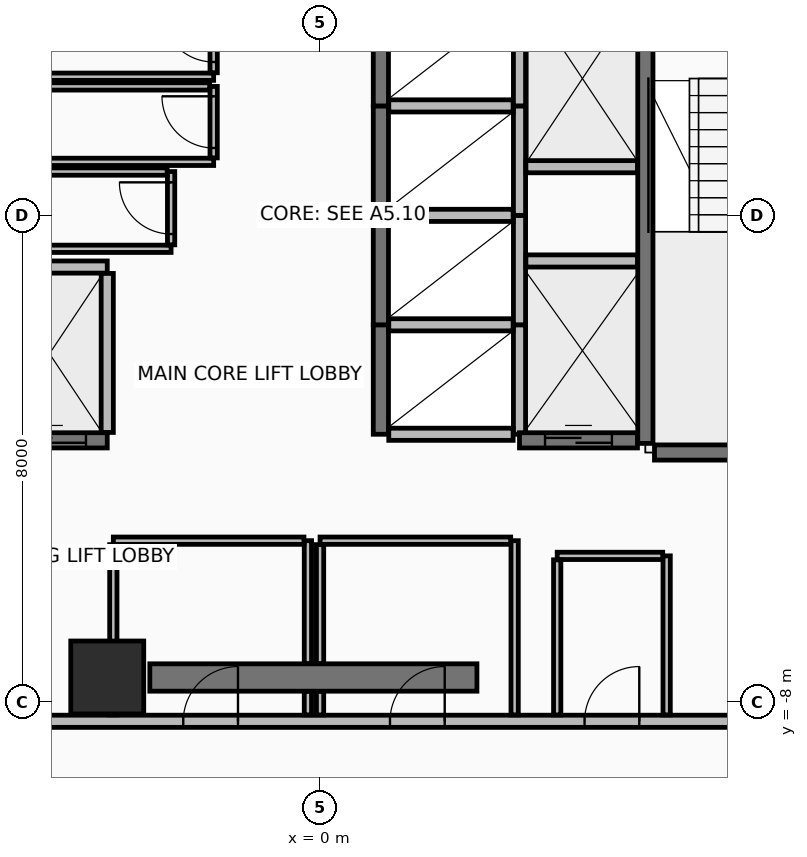
"""IFC4 building model, lengths in metres.
Left out: names, types, materials, properties, quantities, classifications, styles, units other than length and angle.
Written with IfcOpenShell. Run it as: python <this file> out.ifc"""

import sys

from ifc_helpers import new_model, si_unit, direction, frame, frame_2d, origin, origin_2d, place, context, subcontext, project, spatial, rectangle, extrude, element, fill, save


model = new_model("IFC4")
c1 = context("Model", 3, precision=1e-05, world=origin(), true_north=direction((0.0, 1.0)))
c2 = subcontext(c1, "Body", "Model", "MODEL_VIEW")
j1 = project(units=[si_unit("LENGTHUNIT", "METRE"), si_unit("PLANEANGLEUNIT", "RADIAN")], contexts=[c1])
p1 = place(None, origin())
s1 = spatial("IfcSite", under=j1, at=p1, CompositionType="ELEMENT")
p2 = place(p1, origin())
s2 = spatial("IfcBuilding", under=s1, at=p2, CompositionType="ELEMENT")
p3 = place(p2, frame((0.0, 0.0, 174.1)))
s3 = spatial("IfcBuildingStorey", under=s2, at=p3, CompositionType="ELEMENT", Elevation=174.1)
p4 = place(p3, frame((-3.5, -7.6, 0.0), z_axis=(0.0, 0.0, 1.0), x_axis=(1.0, 0.0, 0.0)))
e1 = element("IfcColumn", 1, at=p4, inside=s3, PredefinedType="COLUMN", context=c2, shape_type="SweptSolid", body=[
    extrude(rectangle(XDim=1.2, YDim=1.2, at=origin_2d()), origin(), (0.0, 0.0, 1.0), 3.6),
])
p5 = place(p3, frame((-2.8, -7.6, 0.0), z_axis=(0.0, 0.0, 1.0), x_axis=(1.0, 0.0, 0.0)))
e2 = element("IfcWall", 2, at=p5, inside=s3, PredefinedType="SHEAR", context=c2, shape_type="SweptSolid", body=[
    extrude(rectangle(XDim=5.38, YDim=0.45, at=frame_2d((2.69, 0.0))), origin(), (0.0, 0.0, 1.0), 3.42),
])
p6 = place(p3, frame((-9.62, -8.32, 0.0), z_axis=(0.0, 0.0, 1.0), x_axis=(1.0, 0.0, 0.0)))
e3 = element("IfcWall", 3, at=p6, inside=s3, PredefinedType="PARTITIONING", context=c2, shape_type="SweptSolid", body=[
    extrude(rectangle(XDim=19.24, YDim=0.2, at=frame_2d((9.62, 0.0))), origin(), (0.0, 0.0, 1.0), 2.865),
])
p7 = place(p6, frame((7.37, 0.0, 0.0)))
e4 = element("IfcOpeningElement", 4, at=p7, cuts=e3, PredefinedType="OPENING", context=c2, shape_type="SweptSolid", body=[
    extrude(rectangle(XDim=0.9, YDim=2.1, at=frame_2d((0.45, 1.05))), frame((0.0, 0.11, 0.0), z_axis=(0.0, -1.0, 0.0), x_axis=(1.0, 0.0, 0.0)), (0.0, 0.0, 1.0), 0.22),
])
p8 = place(p6, frame((10.77, 0.0, 0.0)))
e5 = element("IfcOpeningElement", 5, at=p8, cuts=e3, PredefinedType="OPENING", context=c2, shape_type="SweptSolid", body=[
    extrude(rectangle(XDim=0.9, YDim=2.1, at=frame_2d((0.45, 1.05))), frame((0.0, 0.11, 0.0), z_axis=(0.0, -1.0, 0.0), x_axis=(1.0, 0.0, 0.0)), (0.0, 0.0, 1.0), 0.22),
])
p9 = place(p6, frame((13.97, 0.0, 0.0)))
e6 = element("IfcOpeningElement", 6, at=p9, cuts=e3, PredefinedType="OPENING", context=c2, shape_type="SweptSolid", body=[
    extrude(rectangle(XDim=0.9, YDim=2.1, at=frame_2d((0.45, 1.05))), frame((0.0, 0.11, 0.0), z_axis=(0.0, -1.0, 0.0), x_axis=(1.0, 0.0, 0.0)), (0.0, 0.0, 1.0), 0.22),
])
p10 = place(p3, frame((5.35, -3.75, 0.0), z_axis=(0.0, 0.0, 1.0), x_axis=(0.0, 1.0, 0.0)))
e7 = element("IfcWall", 7, at=p10, inside=s3, PredefinedType="SHEAR", context=c2, shape_type="SweptSolid", body=[
    extrude(rectangle(XDim=7.3, YDim=0.25, at=frame_2d((3.65, 0.0))), origin(), (0.0, 0.0, 1.0), 3.42),
])
p11 = place(p3, frame((5.5, -3.9, 0.0), z_axis=(0.0, 0.0, 1.0), x_axis=(1.0, 0.0, 0.0)))
e8 = element("IfcWall", 8, at=p11, inside=s3, PredefinedType="SHEAR", context=c2, shape_type="SweptSolid", body=[
    extrude(rectangle(XDim=3.0, YDim=0.25, at=frame_2d((1.5, 0.0))), origin(), (0.0, 0.0, 1.0), 3.42),
])
p12 = place(p3, frame((1.0, -3.6, 0.0), z_axis=(0.0, 0.0, 1.0), x_axis=(0.0, 1.0, 0.0)))
e9 = element("IfcWall", 9, at=p12, inside=s3, PredefinedType="SHEAR", context=c2, shape_type="SweptSolid", body=[
    extrude(rectangle(XDim=1.8, YDim=0.25, at=frame_2d((0.9, 0.0))), origin(), (0.0, 0.0, 1.0), 3.42),
])
p13 = place(p3, frame((3.28, -3.6, 0.0), z_axis=(0.0, 0.0, 1.0), x_axis=(0.0, 1.0, 0.0)))
e10 = element("IfcWall", 10, at=p13, inside=s3, PredefinedType="PARTITIONING", context=c2, shape_type="SweptSolid", body=[
    extrude(rectangle(XDim=1.8, YDim=0.2, at=frame_2d((0.9, 0.0))), origin(), (0.0, 0.0, 1.0), 3.42),
])
for number, where, z_axis, x_axis in (
    (11, (1.13, -3.6, 0.0), (0.0, 0.0, 1.0), (1.0, 0.0, 0.0)),
    (12, (1.13, -1.8, 0.0), (0.0, 0.0, 1.0), (1.0, 0.0, 0.0)),
):
    element("IfcWall", number, at=place(p3, frame(where, z_axis=z_axis, x_axis=x_axis)), inside=s3, PredefinedType="PARTITIONING", context=c2, shape_type="SweptSolid", body=[
        extrude(rectangle(XDim=2.045, YDim=0.2, at=frame_2d((1.022, 0.0))), origin(), (0.0, 0.0, 1.0), 3.42),
    ])
p14 = place(p3, frame((1.0, -1.8, 0.0), z_axis=(0.0, 0.0, 1.0), x_axis=(0.0, 1.0, 0.0)))
e13 = element("IfcWall", 13, at=p14, inside=s3, PredefinedType="SHEAR", context=c2, shape_type="SweptSolid", body=[
    extrude(rectangle(XDim=1.8, YDim=0.25, at=frame_2d((0.9, 0.0))), origin(), (0.0, 0.0, 1.0), 3.42),
])
p15 = place(p3, frame((3.28, -1.8, 0.0), z_axis=(0.0, 0.0, 1.0), x_axis=(0.0, 1.0, 0.0)))
e14 = element("IfcWall", 14, at=p15, inside=s3, PredefinedType="PARTITIONING", context=c2, shape_type="SweptSolid", body=[
    extrude(rectangle(XDim=1.8, YDim=0.2, at=frame_2d((0.9, 0.0))), origin(), (0.0, 0.0, 1.0), 3.42),
])
p16 = place(p3, frame((1.13, 0.0, 0.0), z_axis=(0.0, 0.0, 1.0), x_axis=(1.0, 0.0, 0.0)))
e15 = element("IfcWall", 15, at=p16, inside=s3, PredefinedType="PARTITIONING", context=c2, shape_type="SweptSolid", body=[
    extrude(rectangle(XDim=2.045, YDim=0.2, at=frame_2d((1.022, 0.0))), origin(), (0.0, 0.0, 1.0), 3.42),
])
p17 = place(p3, frame((1.0, 0.0, 0.0), z_axis=(0.0, 0.0, 1.0), x_axis=(0.0, 1.0, 0.0)))
e16 = element("IfcWall", 16, at=p17, inside=s3, PredefinedType="SHEAR", context=c2, shape_type="SweptSolid", body=[
    extrude(rectangle(XDim=1.8, YDim=0.25, at=frame_2d((0.9, 0.0))), origin(), (0.0, 0.0, 1.0), 3.42),
])
p18 = place(p3, frame((3.28, 0.0, 0.0), z_axis=(0.0, 0.0, 1.0), x_axis=(0.0, 1.0, 0.0)))
e17 = element("IfcWall", 17, at=p18, inside=s3, PredefinedType="PARTITIONING", context=c2, shape_type="SweptSolid", body=[
    extrude(rectangle(XDim=1.8, YDim=0.2, at=frame_2d((0.9, 0.0))), origin(), (0.0, 0.0, 1.0), 3.42),
])
p19 = place(p3, frame((1.13, 1.8, 0.0), z_axis=(0.0, 0.0, 1.0), x_axis=(1.0, 0.0, 0.0)))
e18 = element("IfcWall", 18, at=p19, inside=s3, PredefinedType="PARTITIONING", context=c2, shape_type="SweptSolid", body=[
    extrude(rectangle(XDim=2.045, YDim=0.2, at=frame_2d((1.022, 0.0))), origin(), (0.0, 0.0, 1.0), 3.42),
])
p20 = place(p3, frame((1.0, 1.8, 0.0), z_axis=(0.0, 0.0, 1.0), x_axis=(0.0, 1.0, 0.0)))
e19 = element("IfcWall", 19, at=p20, inside=s3, PredefinedType="SHEAR", context=c2, shape_type="SweptSolid", body=[
    extrude(rectangle(XDim=1.8, YDim=0.25, at=frame_2d((0.9, 0.0))), origin(), (0.0, 0.0, 1.0), 3.42),
])
p21 = place(p3, frame((3.28, 1.8, 0.0), z_axis=(0.0, 0.0, 1.0), x_axis=(0.0, 1.0, 0.0)))
e20 = element("IfcWall", 20, at=p21, inside=s3, PredefinedType="PARTITIONING", context=c2, shape_type="SweptSolid", body=[
    extrude(rectangle(XDim=1.8, YDim=0.2, at=frame_2d((0.9, 0.0))), origin(), (0.0, 0.0, 1.0), 3.42),
])
p22 = place(p3, frame((-5.4, -3.7, 0.0), z_axis=(0.0, 0.0, 1.0), x_axis=(1.0, 0.0, 0.0)))
e21 = element("IfcWall", 21, at=p22, inside=s3, PredefinedType="SHEAR", context=c2, shape_type="SweptSolid", body=[
    extrude(rectangle(XDim=1.9, YDim=0.25, at=frame_2d((0.95, 0.0))), origin(), (0.0, 0.0, 1.0), 3.42),
])
p23 = place(p22, frame((0.35, 0.0, 0.0)))
e22 = element("IfcOpeningElement", 22, at=p23, cuts=e21, PredefinedType="OPENING", context=c2, shape_type="SweptSolid", body=[
    extrude(rectangle(XDim=1.2, YDim=2.2, at=frame_2d((0.6, 1.1))), frame((0.0, 0.135, 0.0), z_axis=(0.0, -1.0, 0.0), x_axis=(1.0, 0.0, 0.0)), (0.0, 0.0, 1.0), 0.27),
])
p24 = place(p3, frame((-5.27, -0.85, 0.0), z_axis=(0.0, 0.0, 1.0), x_axis=(1.0, 0.0, 0.0)))
e23 = element("IfcWall", 23, at=p24, inside=s3, PredefinedType="PARTITIONING", context=c2, shape_type="SweptSolid", body=[
    extrude(rectangle(XDim=1.77, YDim=0.2, at=frame_2d((0.885, 0.0))), origin(), (0.0, 0.0, 1.0), 3.42),
])
p25 = place(p3, frame((-3.5, -3.57, 0.0), z_axis=(0.0, 0.0, 1.0), x_axis=(0.0, 1.0, 0.0)))
e24 = element("IfcWall", 24, at=p25, inside=s3, PredefinedType="PARTITIONING", context=c2, shape_type="SweptSolid", body=[
    extrude(rectangle(XDim=2.615, YDim=0.2, at=frame_2d((1.308, 0.0))), origin(), (0.0, 0.0, 1.0), 3.42),
])
p26 = place(p3, frame((3.385, 0.8, 0.0), z_axis=(0.0, 0.0, 1.0), x_axis=(1.0, 0.0, 0.0)))
e25 = element("IfcWall", 25, at=p26, inside=s3, PredefinedType="PARTITIONING", context=c2, shape_type="SweptSolid", body=[
    extrude(rectangle(XDim=1.835, YDim=0.2, at=frame_2d((0.917, 0.0))), origin(), (0.0, 0.0, 1.0), 3.42),
])
p27 = place(p3, frame((3.28, -3.7, 0.0), z_axis=(0.0, 0.0, 1.0), x_axis=(1.0, 0.0, 0.0)))
e26 = element("IfcWall", 26, at=p27, inside=s3, PredefinedType="SHEAR", context=c2, shape_type="SweptSolid", body=[
    extrude(rectangle(XDim=1.94, YDim=0.25, at=frame_2d((0.97, 0.0))), origin(), (0.0, 0.0, 1.0), 3.42),
])
p28 = place(p27, frame((0.42, 0.0, 0.0)))
e27 = element("IfcOpeningElement", 27, at=p28, cuts=e26, PredefinedType="OPENING", context=c2, shape_type="SweptSolid", body=[
    extrude(rectangle(XDim=1.1, YDim=2.2, at=frame_2d((0.55, 1.1))), frame((0.0, 0.135, 0.0), z_axis=(0.0, -1.0, 0.0), x_axis=(1.0, 0.0, 0.0)), (0.0, 0.0, 1.0), 0.27),
])
p29 = place(p3, frame((3.385, -0.75, 0.0), z_axis=(0.0, 0.0, 1.0), x_axis=(1.0, 0.0, 0.0)))
e28 = element("IfcWall", 28, at=p29, inside=s3, PredefinedType="PARTITIONING", context=c2, shape_type="SweptSolid", body=[
    extrude(rectangle(XDim=1.835, YDim=0.2, at=frame_2d((0.917, 0.0))), origin(), (0.0, 0.0, 1.0), 3.42),
])
p30 = place(p3, frame((-5.22, 2.28, 0.0), z_axis=(0.0, 0.0, 1.0), x_axis=(1.0, 0.0, 0.0)))
e29 = element("IfcWall", 29, at=p30, inside=s3, PredefinedType="PARTITIONING", context=c2, shape_type="SweptSolid", body=[
    extrude(rectangle(XDim=3.47, YDim=0.12, at=frame_2d((1.735, 0.0))), origin(), (0.0, 0.0, 1.0), 3.42),
])
p31 = place(p3, frame((-1.75, 2.345, 0.0), z_axis=(0.0, 0.0, 1.0), x_axis=(0.0, 1.0, 0.0)))
e30 = element("IfcWall", 30, at=p31, inside=s3, PredefinedType="PARTITIONING", context=c2, shape_type="SweptSolid", body=[
    extrude(rectangle(XDim=1.205, YDim=0.12, at=frame_2d((0.603, 0.0))), origin(), (0.0, 0.0, 1.0), 3.42),
])
p32 = place(p31, frame((0.177, 0.0, 0.0)))
e31 = element("IfcOpeningElement", 31, at=p32, cuts=e30, PredefinedType="OPENING", context=c2, shape_type="SweptSolid", body=[
    extrude(rectangle(XDim=0.85, YDim=2.1, at=frame_2d((0.425, 1.05))), frame((0.0, 0.07, 0.0), z_axis=(0.0, -1.0, 0.0), x_axis=(1.0, 0.0, 0.0)), (0.0, 0.0, 1.0), 0.14),
])
p33 = place(p3, frame((-5.22, 0.88, 0.0), z_axis=(0.0, 0.0, 1.0), x_axis=(1.0, 0.0, 0.0)))
e32 = element("IfcWall", 32, at=p33, inside=s3, PredefinedType="PARTITIONING", context=c2, shape_type="SweptSolid", body=[
    extrude(rectangle(XDim=3.47, YDim=0.12, at=frame_2d((1.735, 0.0))), origin(), (0.0, 0.0, 1.0), 3.42),
])
p34 = place(p3, frame((-1.75, 0.945, 0.0), z_axis=(0.0, 0.0, 1.0), x_axis=(0.0, 1.0, 0.0)))
e33 = element("IfcWall", 33, at=p34, inside=s3, PredefinedType="PARTITIONING", context=c2, shape_type="SweptSolid", body=[
    extrude(rectangle(XDim=1.175, YDim=0.12, at=frame_2d((0.587, 0.0))), origin(), (0.0, 0.0, 1.0), 3.42),
])
p35 = place(p34, frame((0.163, 0.0, 0.0)))
e34 = element("IfcOpeningElement", 34, at=p35, cuts=e33, PredefinedType="OPENING", context=c2, shape_type="SweptSolid", body=[
    extrude(rectangle(XDim=0.85, YDim=2.1, at=frame_2d((0.425, 1.05))), frame((0.0, 0.07, 0.0), z_axis=(0.0, -1.0, 0.0), x_axis=(1.0, 0.0, 0.0)), (0.0, 0.0, 1.0), 0.14),
])
p36 = place(p3, frame((-1.815, 2.12, 0.0), z_axis=(0.0, 0.0, 1.0), x_axis=(-1.0, 0.0, 0.0)))
e35 = element("IfcWall", 35, at=p36, inside=s3, PredefinedType="PARTITIONING", context=c2, shape_type="SweptSolid", body=[
    extrude(rectangle(XDim=3.405, YDim=0.12, at=frame_2d((1.703, 0.0))), origin(), (0.0, 0.0, 1.0), 3.42),
])
p37 = place(p3, frame((-5.22, -0.55, 0.0), z_axis=(0.0, 0.0, 1.0), x_axis=(1.0, 0.0, 0.0)))
e36 = element("IfcWall", 36, at=p37, inside=s3, PredefinedType="PARTITIONING", context=c2, shape_type="SweptSolid", body=[
    extrude(rectangle(XDim=2.77, YDim=0.12, at=frame_2d((1.385, 0.0))), origin(), (0.0, 0.0, 1.0), 3.42),
])
p38 = place(p3, frame((-2.45, -0.485, 0.0), z_axis=(0.0, 0.0, 1.0), x_axis=(0.0, 1.0, 0.0)))
e37 = element("IfcWall", 37, at=p38, inside=s3, PredefinedType="PARTITIONING", context=c2, shape_type="SweptSolid", body=[
    extrude(rectangle(XDim=1.205, YDim=0.12, at=frame_2d((0.603, 0.0))), origin(), (0.0, 0.0, 1.0), 3.42),
])
p39 = place(p38, frame((0.178, 0.0, 0.0)))
e38 = element("IfcOpeningElement", 38, at=p39, cuts=e37, PredefinedType="OPENING", context=c2, shape_type="SweptSolid", body=[
    extrude(rectangle(XDim=0.85, YDim=2.1, at=frame_2d((0.425, 1.05))), frame((0.0, 0.07, 0.0), z_axis=(0.0, -1.0, 0.0), x_axis=(1.0, 0.0, 0.0)), (0.0, 0.0, 1.0), 0.14),
])
p40 = place(p3, frame((-2.515, 0.72, 0.0), z_axis=(0.0, 0.0, 1.0), x_axis=(-1.0, 0.0, 0.0)))
e39 = element("IfcWall", 39, at=p40, inside=s3, PredefinedType="PARTITIONING", context=c2, shape_type="SweptSolid", body=[
    extrude(rectangle(XDim=2.705, YDim=0.12, at=frame_2d((1.353, 0.0))), origin(), (0.0, 0.0, 1.0), 3.42),
])
p41 = place(p3, frame((-0.2, -8.215, 0.0), z_axis=(0.0, 0.0, 1.0), x_axis=(0.0, 1.0, 0.0)))
e40 = element("IfcWall", 40, at=p41, inside=s3, PredefinedType="PARTITIONING", context=c2, shape_type="SweptSolid", body=[
    extrude(rectangle(XDim=0.385, YDim=0.12, at=frame_2d((0.192, 0.0))), origin(), (0.0, 0.0, 1.0), 2.715),
])
p42 = place(p3, frame((-0.2, -7.37, 0.0), z_axis=(0.0, 0.0, 1.0), x_axis=(0.0, 1.0, 0.0)))
e41 = element("IfcWall", 41, at=p42, inside=s3, PredefinedType="PARTITIONING", context=c2, shape_type="SweptSolid", body=[
    extrude(rectangle(XDim=2.02, YDim=0.12, at=frame_2d((1.01, 0.0))), origin(), (0.0, 0.0, 1.0), 2.715),
])
p43 = place(p3, frame((-0.265, -5.35, 0.0), z_axis=(0.0, 0.0, 1.0), x_axis=(-1.0, 0.0, 0.0)))
e42 = element("IfcWall", 42, at=p43, inside=s3, PredefinedType="PARTITIONING", context=c2, shape_type="SweptSolid", body=[
    extrude(rectangle(XDim=3.135, YDim=0.12, at=frame_2d((1.567, 0.0))), origin(), (0.0, 0.0, 1.0), 2.715),
])
p44 = place(p3, frame((-3.4, -5.415, 0.0), z_axis=(0.0, 0.0, 1.0), x_axis=(0.0, -1.0, 0.0)))
e43 = element("IfcWall", 43, at=p44, inside=s3, PredefinedType="PARTITIONING", context=c2, shape_type="SweptSolid", body=[
    extrude(rectangle(XDim=2.8, YDim=0.12, at=frame_2d((1.4, 0.0))), origin(), (0.0, 0.0, 1.0), 2.715),
])
p45 = place(p3, frame((3.2, -8.215, 0.0), z_axis=(0.0, 0.0, 1.0), x_axis=(0.0, 1.0, 0.0)))
e44 = element("IfcWall", 44, at=p45, inside=s3, PredefinedType="PARTITIONING", context=c2, shape_type="SweptSolid", body=[
    extrude(rectangle(XDim=2.865, YDim=0.12, at=frame_2d((1.433, 0.0))), origin(), (0.0, 0.0, 1.0), 2.715),
])
p46 = place(p3, frame((3.135, -5.35, 0.0), z_axis=(0.0, 0.0, 1.0), x_axis=(-1.0, 0.0, 0.0)))
e45 = element("IfcWall", 45, at=p46, inside=s3, PredefinedType="PARTITIONING", context=c2, shape_type="SweptSolid", body=[
    extrude(rectangle(XDim=3.135, YDim=0.12, at=frame_2d((1.567, 0.0))), origin(), (0.0, 0.0, 1.0), 3.42),
])
p47 = place(p3, frame((0.0, -5.415, 0.0), z_axis=(0.0, 0.0, 1.0), x_axis=(0.0, -1.0, 0.0)))
e46 = element("IfcWall", 46, at=p47, inside=s3, PredefinedType="PARTITIONING", context=c2, shape_type="SweptSolid", body=[
    extrude(rectangle(XDim=1.955, YDim=0.12, at=frame_2d((0.978, 0.0))), origin(), (0.0, 0.0, 1.0), 2.715),
])
p48 = place(p3, frame((0.0, -7.83, 0.0), z_axis=(0.0, 0.0, 1.0), x_axis=(0.0, -1.0, 0.0)))
e47 = element("IfcWall", 47, at=p48, inside=s3, PredefinedType="PARTITIONING", context=c2, shape_type="SweptSolid", body=[
    extrude(rectangle(XDim=0.385, YDim=0.12, at=frame_2d((0.192, 0.0))), origin(), (0.0, 0.0, 1.0), 2.715),
])
p49 = place(p3, frame((5.7, -8.215, 0.0), z_axis=(0.0, 0.0, 1.0), x_axis=(0.0, 1.0, 0.0)))
e48 = element("IfcWall", 48, at=p49, inside=s3, PredefinedType="PARTITIONING", context=c2, shape_type="SweptSolid", body=[
    extrude(rectangle(XDim=2.615, YDim=0.12, at=frame_2d((1.308, 0.0))), origin(), (0.0, 0.0, 1.0), 2.715),
])
p50 = place(p3, frame((5.635, -5.6, 0.0), z_axis=(0.0, 0.0, 1.0), x_axis=(-1.0, 0.0, 0.0)))
e49 = element("IfcWall", 49, at=p50, inside=s3, PredefinedType="PARTITIONING", context=c2, shape_type="SweptSolid", body=[
    extrude(rectangle(XDim=1.735, YDim=0.12, at=frame_2d((0.868, 0.0))), origin(), (0.0, 0.0, 1.0), 3.42),
])
p51 = place(p3, frame((3.9, -5.665, 0.0), z_axis=(0.0, 0.0, 1.0), x_axis=(0.0, -1.0, 0.0)))
e50 = element("IfcWall", 50, at=p51, inside=s3, PredefinedType="PARTITIONING", context=c2, shape_type="SweptSolid", body=[
    extrude(rectangle(XDim=2.55, YDim=0.12, at=frame_2d((1.275, 0.0))), origin(), (0.0, 0.0, 1.0), 2.715),
])
p52 = place(p23, origin())
e51 = element("IfcDoor", 51, at=p52, inside=s3, OperationType="SLIDING_TO_RIGHT", PredefinedType="DOOR", context=c2, shape_type="SweptSolid", body=[
    extrude(rectangle(XDim=1.2, YDim=2.2, at=frame_2d((0.6, 1.1))), frame((0.0, 0.025, 0.0), z_axis=(0.0, -1.0, 0.0), x_axis=(1.0, 0.0, 0.0)), (0.0, 0.0, 1.0), 0.05),
])
fill(e22, e51)
p53 = place(p28, origin())
e52 = element("IfcDoor", 52, at=p53, inside=s3, OperationType="SLIDING_TO_LEFT", PredefinedType="DOOR", context=c2, shape_type="SweptSolid", body=[
    extrude(rectangle(XDim=1.1, YDim=2.2, at=frame_2d((0.55, 1.1))), frame((0.0, 0.025, 0.0), z_axis=(0.0, -1.0, 0.0), x_axis=(1.0, 0.0, 0.0)), (0.0, 0.0, 1.0), 0.05),
])
fill(e27, e52)
p54 = place(p32, frame((0.85, 0.0, 0.0), z_axis=(0.0, 0.0, 1.0), x_axis=(-1.0, 0.0, 0.0)))
e53 = element("IfcDoor", 53, at=p54, inside=s3, OperationType="SINGLE_SWING_RIGHT", PredefinedType="DOOR", context=c2, shape_type="SweptSolid", body=[
    extrude(rectangle(XDim=0.85, YDim=2.1, at=frame_2d((0.425, 1.05))), frame((0.0, 0.025, 0.0), z_axis=(0.0, -1.0, 0.0), x_axis=(1.0, 0.0, 0.0)), (0.0, 0.0, 1.0), 0.05),
])
fill(e31, e53)
p55 = place(p35, frame((0.85, 0.0, 0.0), z_axis=(0.0, 0.0, 1.0), x_axis=(-1.0, 0.0, 0.0)))
e54 = element("IfcDoor", 54, at=p55, inside=s3, OperationType="SINGLE_SWING_RIGHT", PredefinedType="DOOR", context=c2, shape_type="SweptSolid", body=[
    extrude(rectangle(XDim=0.85, YDim=2.1, at=frame_2d((0.425, 1.05))), frame((0.0, 0.025, 0.0), z_axis=(0.0, -1.0, 0.0), x_axis=(1.0, 0.0, 0.0)), (0.0, 0.0, 1.0), 0.05),
])
fill(e34, e54)
p56 = place(p39, frame((0.85, 0.0, 0.0), z_axis=(0.0, 0.0, 1.0), x_axis=(-1.0, 0.0, 0.0)))
e55 = element("IfcDoor", 55, at=p56, inside=s3, OperationType="SINGLE_SWING_RIGHT", PredefinedType="DOOR", context=c2, shape_type="SweptSolid", body=[
    extrude(rectangle(XDim=0.85, YDim=2.1, at=frame_2d((0.425, 1.05))), frame((0.0, 0.025, 0.0), z_axis=(0.0, -1.0, 0.0), x_axis=(1.0, 0.0, 0.0)), (0.0, 0.0, 1.0), 0.05),
])
fill(e38, e55)
p57 = place(p7, frame((0.9, 0.0, 0.0), z_axis=(0.0, 0.0, 1.0), x_axis=(-1.0, 0.0, 0.0)))
e56 = element("IfcDoor", 56, at=p57, inside=s3, OperationType="SINGLE_SWING_LEFT", PredefinedType="DOOR", context=c2, shape_type="SweptSolid", body=[
    extrude(rectangle(XDim=0.9, YDim=2.1, at=frame_2d((0.45, 1.05))), frame((0.0, 0.025, 0.0), z_axis=(0.0, -1.0, 0.0), x_axis=(1.0, 0.0, 0.0)), (0.0, 0.0, 1.0), 0.05),
])
fill(e4, e56)
p58 = place(p8, frame((0.9, 0.0, 0.0), z_axis=(0.0, 0.0, 1.0), x_axis=(-1.0, 0.0, 0.0)))
e57 = element("IfcDoor", 57, at=p58, inside=s3, OperationType="SINGLE_SWING_LEFT", PredefinedType="DOOR", context=c2, shape_type="SweptSolid", body=[
    extrude(rectangle(XDim=0.9, YDim=2.1, at=frame_2d((0.45, 1.05))), frame((0.0, 0.025, 0.0), z_axis=(0.0, -1.0, 0.0), x_axis=(1.0, 0.0, 0.0)), (0.0, 0.0, 1.0), 0.05),
])
fill(e5, e57)
p59 = place(p9, frame((0.9, 0.0, 0.0), z_axis=(0.0, 0.0, 1.0), x_axis=(-1.0, 0.0, 0.0)))
e58 = element("IfcDoor", 58, at=p59, inside=s3, OperationType="SINGLE_SWING_LEFT", PredefinedType="DOOR", context=c2, shape_type="SweptSolid", body=[
    extrude(rectangle(XDim=0.9, YDim=2.1, at=frame_2d((0.45, 1.05))), frame((0.0, 0.025, 0.0), z_axis=(0.0, -1.0, 0.0), x_axis=(1.0, 0.0, 0.0)), (0.0, 0.0, 1.0), 0.05),
])
fill(e6, e58)
save(model, sys.argv[1])
